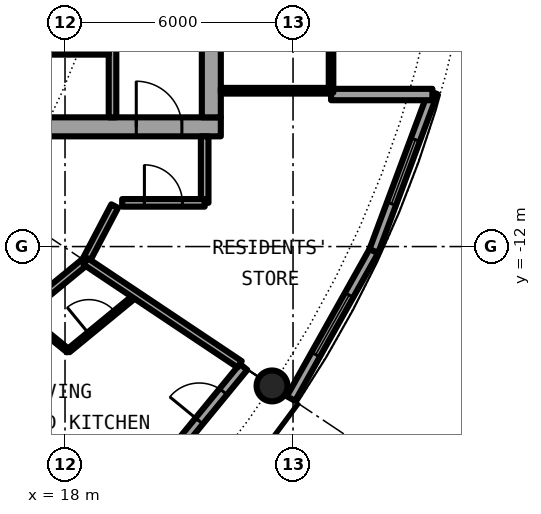
"""IFC4 building model, lengths in metres.
Left out: names, types, materials, properties, quantities, classifications, styles, units other than length and angle.
Written with IfcOpenShell. Run it as: python <this file> out.ifc"""

import sys

from ifc_helpers import new_model, si_unit, direction, frame, frame_2d, origin, origin_2d, place, context, subcontext, project, spatial, rectangle, hollow_circle, extrude, element, fill, save


model = new_model("IFC4")
c1 = context("Model", 3, precision=1e-05, world=origin(), true_north=direction((0.0, 1.0)))
c2 = subcontext(c1, "Body", "Model", "MODEL_VIEW")
j1 = project(units=[si_unit("LENGTHUNIT", "METRE"), si_unit("PLANEANGLEUNIT", "RADIAN")], contexts=[c1])
p1 = place(None, origin())
s1 = spatial("IfcSite", under=j1, at=p1, CompositionType="ELEMENT")
p2 = place(p1, origin())
s2 = spatial("IfcBuilding", under=s1, at=p2, CompositionType="ELEMENT")
p3 = place(p2, frame((0.0, 0.0, 151.3)))
s3 = spatial("IfcBuildingStorey", under=s2, at=p3, CompositionType="ELEMENT", Elevation=151.3)
p4 = place(p3, frame((23.448, -15.667, 0.0), z_axis=(0.0, 0.0, 1.0), x_axis=(1.0, 0.0, 0.0)))
e1 = element("IfcColumn", 1, at=p4, inside=s3, PredefinedType="COLUMN", context=c2, shape_type="SweptSolid", body=[
    extrude(hollow_circle(Radius=0.406, WallThickness=0.04, at=origin_2d()), origin(), (0.0, 0.0, 1.0), 3.05),
])
p5 = place(p3, frame((19.304, -19.304, 0.0), z_axis=(0.0, 0.0, 1.0), x_axis=(0.634382322723, 0.773019449054, 0.0)))
e2 = element("IfcWall", 2, at=p5, inside=s3, PredefinedType="SOLIDWALL", context=c2, shape_type="SweptSolid", body=[
    extrude(rectangle(XDim=5.352, YDim=0.25, at=frame_2d((2.676, 0.0))), origin(), (0.0, 0.0, 1.0), 2.7),
])
p6 = place(p5, frame((0.441, 0.0, 0.3)))
e3 = element("IfcOpeningElement", 3, at=p6, cuts=e2, PredefinedType="OPENING", context=c2, shape_type="SweptSolid", body=[
    extrude(rectangle(XDim=1.8, YDim=2.1, at=frame_2d((0.9, 1.05))), frame((0.0, 0.135, 0.0), z_axis=(0.0, -1.0, 0.0), x_axis=(1.0, 0.0, 0.0)), (0.0, 0.0, 1.0), 0.27),
])
p7 = place(p5, frame((3.51, 0.0, 0.0)))
e4 = element("IfcOpeningElement", 4, at=p7, cuts=e2, PredefinedType="OPENING", context=c2, shape_type="SweptSolid", body=[
    extrude(rectangle(XDim=1.0, YDim=2.2, at=frame_2d((0.5, 1.1))), frame((0.0, 0.135, 0.0), z_axis=(0.0, -1.0, 0.0), x_axis=(1.0, 0.0, 0.0)), (0.0, 0.0, 1.0), 0.27),
])
p8 = place(p3, frame((23.946, -16.0, 0.0), z_axis=(0.0, 0.0, 1.0), x_axis=(0.489696356642, 0.871893042919, 0.0)))
e5 = element("IfcWall", 5, at=p8, inside=s3, PredefinedType="SOLIDWALL", context=c2, shape_type="SweptSolid", body=[
    extrude(rectangle(XDim=4.454, YDim=0.25, at=frame_2d((2.227, 0.0))), origin(), (0.0, 0.0, 1.0), 2.7),
])
p9 = place(p8, frame((1.327, 0.0, 0.3)))
e6 = element("IfcOpeningElement", 6, at=p9, cuts=e5, PredefinedType="OPENING", context=c2, shape_type="SweptSolid", body=[
    extrude(rectangle(XDim=1.8, YDim=2.1, at=frame_2d((0.9, 1.05))), frame((0.0, 0.135, 0.0), z_axis=(0.0, -1.0, 0.0), x_axis=(1.0, 0.0, 0.0)), (0.0, 0.0, 1.0), 0.27),
])
p10 = place(p3, frame((26.127, -12.117, 0.0), z_axis=(0.0, 0.0, 1.0), x_axis=(0.349247811493, 0.937030397675, 0.0)))
e7 = element("IfcWall", 7, at=p10, inside=s3, PredefinedType="SOLIDWALL", context=c2, shape_type="SweptSolid", body=[
    extrude(rectangle(XDim=4.452, YDim=0.25, at=frame_2d((2.226, 0.0))), origin(), (0.0, 0.0, 1.0), 2.7),
])
p11 = place(p10, frame((1.327, 0.0, 0.3)))
e8 = element("IfcOpeningElement", 8, at=p11, cuts=e7, PredefinedType="OPENING", context=c2, shape_type="SweptSolid", body=[
    extrude(rectangle(XDim=1.8, YDim=2.1, at=frame_2d((0.9, 1.05))), frame((0.0, 0.135, 0.0), z_axis=(0.0, -1.0, 0.0), x_axis=(1.0, 0.0, 0.0)), (0.0, 0.0, 1.0), 0.27),
])
p12 = place(p3, frame((25.0, -8.0, 0.0), z_axis=(0.0, 0.0, 1.0), x_axis=(1.0, 0.0, 0.0)))
e9 = element("IfcWall", 9, at=p12, inside=s3, PredefinedType="SOLIDWALL", context=c2, shape_type="SweptSolid", body=[
    extrude(rectangle(XDim=2.667, YDim=0.3, at=frame_2d((1.333, 0.0))), origin(), (0.0, 0.0, 1.0), 2.7),
])
p13 = place(p3, frame((8.5, -8.85, 0.0), z_axis=(0.0, 0.0, 1.0), x_axis=(1.0, 0.0, 0.0)))
e10 = element("IfcWall", 10, at=p13, inside=s3, PredefinedType="SHEAR", context=c2, shape_type="SweptSolid", body=[
    extrude(rectangle(XDim=13.6, YDim=0.5, at=frame_2d((6.8, 0.0))), origin(), (0.0, 0.0, 1.0), 3.05),
])
p14 = place(p13, frame((11.375, 0.0, 0.0)))
e11 = element("IfcOpeningElement", 11, at=p14, cuts=e10, PredefinedType="OPENING", context=c2, shape_type="SweptSolid", body=[
    extrude(rectangle(XDim=1.2, YDim=2.3, at=frame_2d((0.6, 1.15))), frame((0.0, 0.26, 0.0), z_axis=(0.0, -1.0, 0.0), x_axis=(1.0, 0.0, 0.0)), (0.0, 0.0, 1.0), 0.52),
])
p15 = place(p3, frame((21.85, 8.6, 0.0), z_axis=(0.0, 0.0, 1.0), x_axis=(0.0, -1.0, 0.0)))
e12 = element("IfcWall", 12, at=p15, inside=s3, PredefinedType="SHEAR", context=c2, shape_type="SweptSolid", body=[
    extrude(rectangle(XDim=17.2, YDim=0.5, at=frame_2d((8.6, 0.0))), origin(), (0.0, 0.0, 1.0), 3.05),
])
p16 = place(p15, frame((7.7, 0.0, 0.0)))
e13 = element("IfcOpeningElement", 13, at=p16, cuts=e12, PredefinedType="OPENING", context=c2, shape_type="SweptSolid", body=[
    extrude(rectangle(XDim=1.8, YDim=2.3, at=frame_2d((0.9, 1.15))), frame((0.0, 0.26, 0.0), z_axis=(0.0, -1.0, 0.0), x_axis=(1.0, 0.0, 0.0)), (0.0, 0.0, 1.0), 0.52),
])
p17 = place(p3, frame((19.25, -8.6, 0.0), z_axis=(0.0, 0.0, 1.0), x_axis=(0.0, 1.0, 0.0)))
e14 = element("IfcWall", 14, at=p17, inside=s3, PredefinedType="SOLIDWALL", context=c2, shape_type="SweptSolid", body=[
    extrude(rectangle(XDim=7.025, YDim=0.2, at=frame_2d((3.513, 0.0))), origin(), (0.0, 0.0, 1.0), 2.7),
])
p18 = place(p17, frame((2.35, 0.0, 0.0)))
e15 = element("IfcOpeningElement", 15, at=p18, cuts=e14, PredefinedType="OPENING", context=c2, shape_type="SweptSolid", body=[
    extrude(rectangle(XDim=1.1, YDim=2.3, at=frame_2d((0.55, 1.15))), frame((0.0, 0.11, 0.0), z_axis=(0.0, -1.0, 0.0), x_axis=(1.0, 0.0, 0.0)), (0.0, 0.0, 1.0), 0.22),
])
p19 = place(p3, frame((15.45, -6.875, 0.0), z_axis=(0.0, 0.0, 1.0), x_axis=(1.0, 0.0, 0.0)))
e16 = element("IfcWall", 16, at=p19, inside=s3, PredefinedType="PARTITIONING", context=c2, shape_type="SweptSolid", body=[
    extrude(rectangle(XDim=3.7, YDim=0.15, at=frame_2d((1.85, 0.0))), origin(), (0.0, 0.0, 1.0), 2.7),
])
p20 = place(p19, frame((1.4, 0.0, 0.0)))
e17 = element("IfcOpeningElement", 17, at=p20, cuts=e16, PredefinedType="OPENING", context=c2, shape_type="SweptSolid", body=[
    extrude(rectangle(XDim=0.9, YDim=2.3, at=frame_2d((0.45, 1.15))), frame((0.0, 0.085, 0.0), z_axis=(0.0, -1.0, 0.0), x_axis=(1.0, 0.0, 0.0)), (0.0, 0.0, 1.0), 0.17),
])
p21 = place(p3, frame((22.1, -7.9, 0.0), z_axis=(0.0, 0.0, 1.0), x_axis=(1.0, 0.0, 0.0)))
e18 = element("IfcWall", 18, at=p21, inside=s3, PredefinedType="PARTITIONING", context=c2, shape_type="SweptSolid", body=[
    extrude(rectangle(XDim=2.84, YDim=0.15, at=frame_2d((1.42, 0.0))), origin(), (0.0, 0.0, 1.0), 2.7),
])
p22 = place(p3, frame((25.0, -7.95, 0.0), z_axis=(0.0, 0.0, 1.0), x_axis=(0.0, 1.0, 0.0)))
e19 = element("IfcWall", 19, at=p22, inside=s3, PredefinedType="PARTITIONING", context=c2, shape_type="SweptSolid", body=[
    extrude(rectangle(XDim=15.9, YDim=0.12, at=frame_2d((7.95, 0.0))), origin(), (0.0, 0.0, 1.0), 2.7),
])
p23 = place(p22, frame((0.95, 0.0, 0.1)))
e20 = element("IfcOpeningElement", 20, at=p23, cuts=e19, PredefinedType="OPENING", context=c2, shape_type="SweptSolid", body=[
    extrude(rectangle(XDim=14.0, YDim=2.35, at=frame_2d((7.0, 1.175))), frame((0.0, 0.07, 0.0), z_axis=(0.0, -1.0, 0.0), x_axis=(1.0, 0.0, 0.0)), (0.0, 0.0, 1.0), 0.14),
])
p24 = place(p3, frame((18.087, -14.742, 0.0), z_axis=(0.0, 0.0, 1.0), x_axis=(0.77288890179, 0.634541366256, 0.0)))
e21 = element("IfcWall", 21, at=p24, inside=s3, PredefinedType="PARTITIONING", context=c2, shape_type="SweptSolid", body=[
    extrude(rectangle(XDim=2.313, YDim=0.1, at=frame_2d((1.157, 0.0))), origin(), (0.0, 0.0, 1.0), 2.7),
])
p25 = place(p24, frame((0.702, 0.0, 0.0)))
e22 = element("IfcOpeningElement", 22, at=p25, cuts=e21, PredefinedType="OPENING", context=c2, shape_type="SweptSolid", body=[
    extrude(rectangle(XDim=0.9, YDim=2.3, at=frame_2d((0.45, 1.15))), frame((0.0, 0.06, 0.0), z_axis=(0.0, -1.0, 0.0), x_axis=(1.0, 0.0, 0.0)), (0.0, 0.0, 1.0), 0.12),
])
p26 = place(p3, frame((18.542, -12.389, 0.0), z_axis=(0.0, 0.0, 1.0), x_axis=(0.465605550524, 0.884992356646, 0.0)))
e23 = element("IfcWall", 23, at=p26, inside=s3, PredefinedType="PARTITIONING", context=c2, shape_type="SweptSolid", body=[
    extrude(rectangle(XDim=1.643, YDim=0.2, at=frame_2d((0.821, 0.0))), origin(), (0.0, 0.0, 1.0), 2.7),
])
p27 = place(p3, frame((21.675, -10.85, 0.0), z_axis=(0.0, 0.0, 1.0), x_axis=(0.0, 1.0, 0.0)))
e24 = element("IfcWall", 24, at=p27, inside=s3, PredefinedType="PARTITIONING", context=c2, shape_type="SweptSolid", body=[
    extrude(rectangle(XDim=1.75, YDim=0.2, at=frame_2d((0.875, 0.0))), origin(), (0.0, 0.0, 1.0), 2.7),
])
p28 = place(p3, frame((8.534, -20.603, 0.0), z_axis=(0.0, 0.0, 1.0), x_axis=(0.772983503654, 0.634426121056, 0.0)))
e25 = element("IfcWall", 25, at=p28, inside=s3, PredefinedType="PARTITIONING", context=c2, shape_type="SweptSolid", body=[
    extrude(rectangle(XDim=12.947, YDim=0.2, at=frame_2d((6.474, 0.0))), origin(), (0.0, 0.0, 1.0), 2.7),
])
p29 = place(p28, frame((4.895, 0.0, 0.0)))
e26 = element("IfcOpeningElement", 26, at=p29, cuts=e25, PredefinedType="OPENING", context=c2, shape_type="SweptSolid", body=[
    extrude(rectangle(XDim=1.0, YDim=2.3, at=frame_2d((0.5, 1.15))), frame((0.0, 0.11, 0.0), z_axis=(0.0, -1.0, 0.0), x_axis=(1.0, 0.0, 0.0)), (0.0, 0.0, 1.0), 0.22),
])
p30 = place(p3, frame((19.504, -10.85, 0.0), z_axis=(0.0, 0.0, 1.0), x_axis=(1.0, 0.0, 0.0)))
e27 = element("IfcWall", 27, at=p30, inside=s3, PredefinedType="PARTITIONING", context=c2, shape_type="SweptSolid", body=[
    extrude(rectangle(XDim=2.171, YDim=0.2, at=frame_2d((1.085, 0.0))), origin(), (0.0, 0.0, 1.0), 2.7),
])
p31 = place(p30, frame((0.585, 0.0, 0.0)))
e28 = element("IfcOpeningElement", 28, at=p31, cuts=e27, PredefinedType="OPENING", context=c2, shape_type="SweptSolid", body=[
    extrude(rectangle(XDim=1.0, YDim=2.3, at=frame_2d((0.5, 1.15))), frame((0.0, 0.11, 0.0), z_axis=(0.0, -1.0, 0.0), x_axis=(1.0, 0.0, 0.0)), (0.0, 0.0, 1.0), 0.22),
])
p32 = place(p3, frame((16.874, -13.758, 0.0), z_axis=(0.0, 0.0, 1.0), x_axis=(0.774869051393, -0.632121786679, 0.0)))
e29 = element("IfcWall", 29, at=p32, inside=s3, PredefinedType="PARTITIONING", context=c2, shape_type="SweptSolid", body=[
    extrude(rectangle(XDim=1.562, YDim=0.1, at=frame_2d((0.781, 0.0))), origin(), (0.0, 0.0, 1.0), 2.7),
])
p33 = place(p3, frame((18.542, -12.389, 0.0), z_axis=(0.0, 0.0, 1.0), x_axis=(0.831387096605, -0.55569370664, 0.0)))
e30 = element("IfcWall", 30, at=p33, inside=s3, PredefinedType="PARTITIONING", context=c2, shape_type="SweptSolid", body=[
    extrude(rectangle(XDim=4.875, YDim=0.2, at=frame_2d((2.438, 0.0))), origin(), (0.0, 0.0, 1.0), 2.7),
])
p34 = place(p7, origin())
e31 = element("IfcDoor", 31, at=p34, inside=s3, OperationType="SINGLE_SWING_LEFT", PredefinedType="DOOR", context=c2, shape_type="SweptSolid", body=[
    extrude(rectangle(XDim=1.0, YDim=2.2, at=frame_2d((0.5, 1.1))), frame((0.0, 0.025, 0.0), z_axis=(0.0, -1.0, 0.0), x_axis=(1.0, 0.0, 0.0)), (0.0, 0.0, 1.0), 0.05),
])
fill(e4, e31)
p35 = place(p9, origin())
e32 = element("IfcWindow", 32, at=p35, inside=s3, PartitioningType="SINGLE_PANEL", PredefinedType="WINDOW", context=c2, shape_type="SweptSolid", body=[
    extrude(rectangle(XDim=1.8, YDim=2.1, at=frame_2d((0.9, 1.05))), frame((0.0, 0.03, 0.0), z_axis=(0.0, -1.0, 0.0), x_axis=(1.0, 0.0, 0.0)), (0.0, 0.0, 1.0), 0.06),
])
fill(e6, e32)
p36 = place(p11, origin())
e33 = element("IfcWindow", 33, at=p36, inside=s3, PartitioningType="SINGLE_PANEL", PredefinedType="WINDOW", context=c2, shape_type="SweptSolid", body=[
    extrude(rectangle(XDim=1.8, YDim=2.1, at=frame_2d((0.9, 1.05))), frame((0.0, 0.03, 0.0), z_axis=(0.0, -1.0, 0.0), x_axis=(1.0, 0.0, 0.0)), (0.0, 0.0, 1.0), 0.06),
])
fill(e8, e33)
p37 = place(p20, origin())
e34 = element("IfcDoor", 34, at=p37, inside=s3, OperationType="SINGLE_SWING_LEFT", PredefinedType="DOOR", context=c2, shape_type="SweptSolid", body=[
    extrude(rectangle(XDim=0.9, YDim=2.3, at=frame_2d((0.45, 1.15))), frame((0.0, 0.025, 0.0), z_axis=(0.0, -1.0, 0.0), x_axis=(1.0, 0.0, 0.0)), (0.0, 0.0, 1.0), 0.05),
])
fill(e17, e34)
p38 = place(p14, origin())
e35 = element("IfcDoor", 35, at=p38, inside=s3, OperationType="SINGLE_SWING_LEFT", PredefinedType="DOOR", context=c2, shape_type="SweptSolid", body=[
    extrude(rectangle(XDim=1.2, YDim=2.3, at=frame_2d((0.6, 1.15))), frame((0.0, 0.025, 0.0), z_axis=(0.0, -1.0, 0.0), x_axis=(1.0, 0.0, 0.0)), (0.0, 0.0, 1.0), 0.05),
])
fill(e11, e35)
p39 = place(p23, origin())
e36 = element("IfcWindow", 36, at=p39, inside=s3, PartitioningType="SINGLE_PANEL", PredefinedType="WINDOW", context=c2, shape_type="SweptSolid", body=[
    extrude(rectangle(XDim=14.0, YDim=2.35, at=frame_2d((7.0, 1.175))), frame((0.0, 0.03, 0.0), z_axis=(0.0, -1.0, 0.0), x_axis=(1.0, 0.0, 0.0)), (0.0, 0.0, 1.0), 0.06),
])
fill(e20, e36)
p40 = place(p25, origin())
e37 = element("IfcDoor", 37, at=p40, inside=s3, OperationType="SINGLE_SWING_LEFT", PredefinedType="DOOR", context=c2, shape_type="SweptSolid", body=[
    extrude(rectangle(XDim=0.9, YDim=2.3, at=frame_2d((0.45, 1.15))), frame((0.0, 0.025, 0.0), z_axis=(0.0, -1.0, 0.0), x_axis=(1.0, 0.0, 0.0)), (0.0, 0.0, 1.0), 0.05),
])
fill(e22, e37)
p41 = place(p31, origin())
e38 = element("IfcDoor", 38, at=p41, inside=s3, OperationType="SINGLE_SWING_LEFT", PredefinedType="DOOR", context=c2, shape_type="SweptSolid", body=[
    extrude(rectangle(XDim=1.0, YDim=2.3, at=frame_2d((0.5, 1.15))), frame((0.0, 0.025, 0.0), z_axis=(0.0, -1.0, 0.0), x_axis=(1.0, 0.0, 0.0)), (0.0, 0.0, 1.0), 0.05),
])
fill(e28, e38)
save(model, sys.argv[1])
